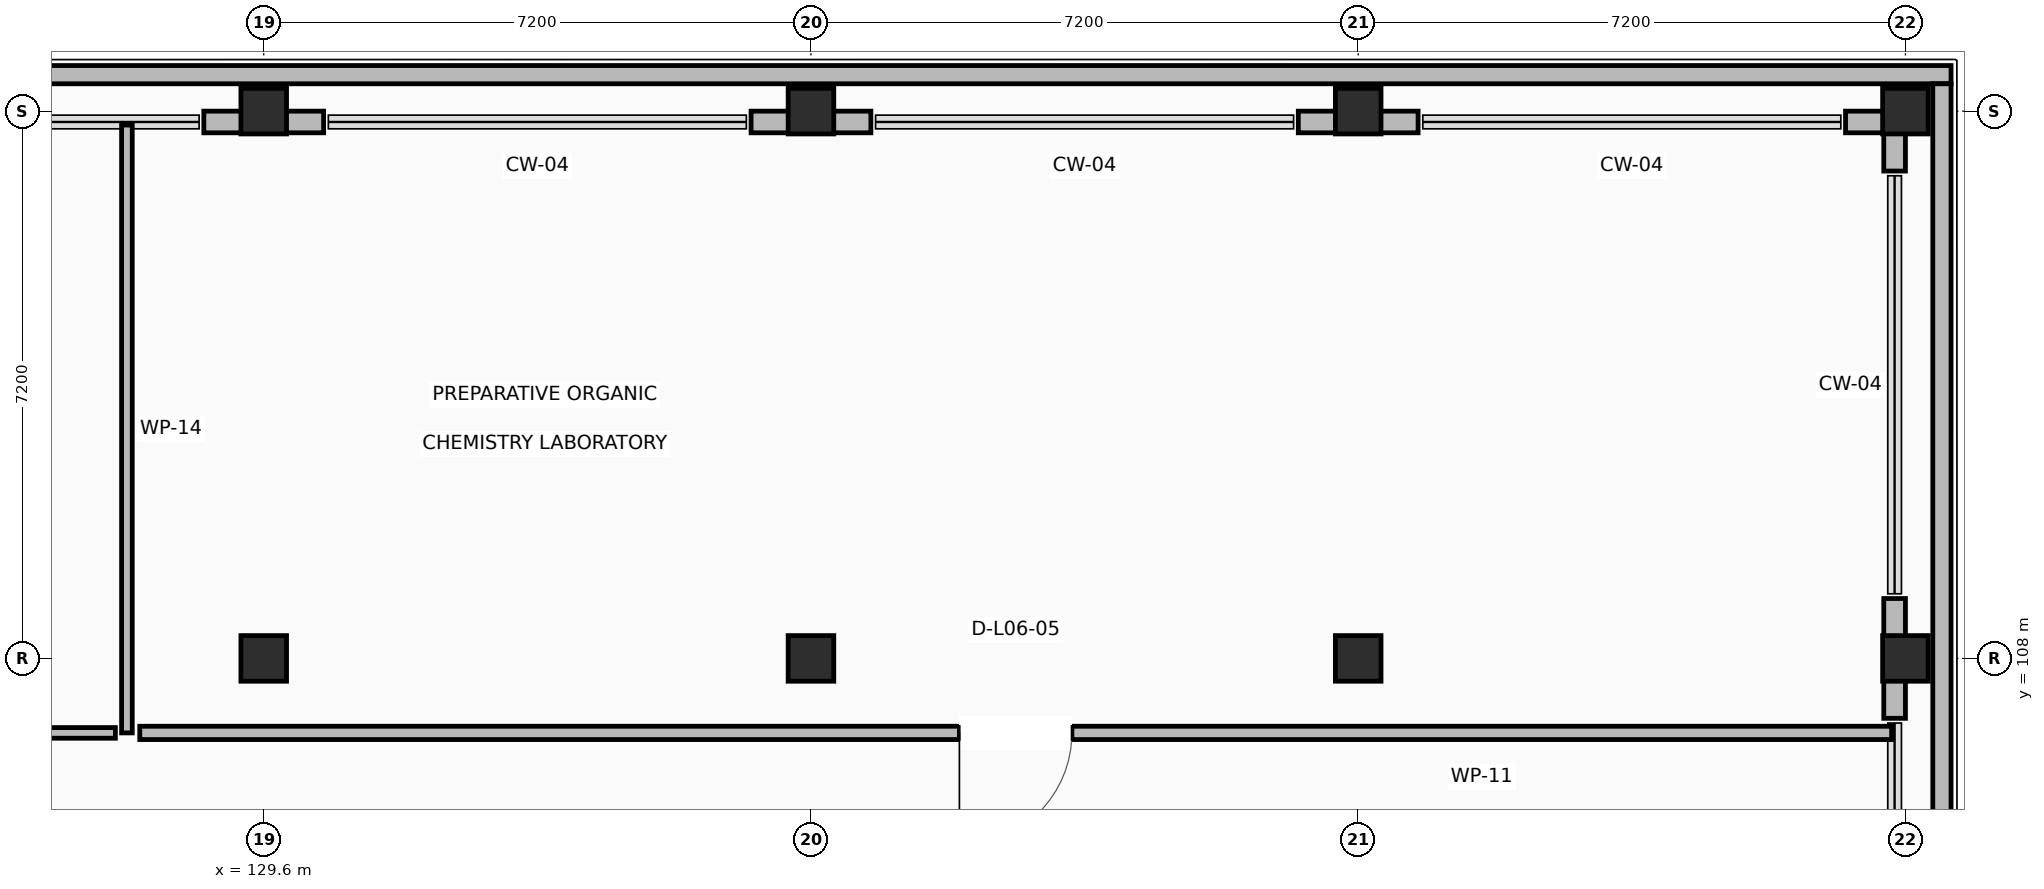
"""IFC4 building model, lengths in metres.
Left out: names, types, materials, properties, quantities, classifications, styles, units other than length and angle.
Written with IfcOpenShell. Run it as: python <this file> out.ifc"""

import sys

from ifc_helpers import new_model, si_unit, direction, frame, frame_2d, origin, origin_2d, place, context, subcontext, project, spatial, rectangle, extrude, element, fill, save


model = new_model("IFC4")
c1 = context("Model", 3, precision=1e-05, world=origin(), true_north=direction((0.0, 1.0)))
c2 = subcontext(c1, "Body", "Model", "MODEL_VIEW")
j1 = project(units=[si_unit("LENGTHUNIT", "METRE"), si_unit("PLANEANGLEUNIT", "RADIAN")], contexts=[c1])
p1 = place(None, origin())
s1 = spatial("IfcSite", under=j1, at=p1, CompositionType="ELEMENT")
p2 = place(p1, origin())
s2 = spatial("IfcBuilding", under=s1, at=p2, CompositionType="ELEMENT")
p3 = place(p2, frame((0.0, 0.0, 27.0)))
s3 = spatial("IfcBuildingStorey", under=s2, at=p3, CompositionType="ELEMENT", Elevation=27.0)
for number, where, z_axis, x_axis in (
    (1, (129.6, 108.0, 0.0), (0.0, 0.0, 1.0), (1.0, 0.0, 0.0)),
    (2, (129.6, 115.2, 0.0), (0.0, 0.0, 1.0), (1.0, 0.0, 0.0)),
    (3, (136.8, 108.0, 0.0), (0.0, 0.0, 1.0), (1.0, 0.0, 0.0)),
    (4, (136.8, 115.2, 0.0), (0.0, 0.0, 1.0), (1.0, 0.0, 0.0)),
    (5, (144.0, 108.0, 0.0), (0.0, 0.0, 1.0), (1.0, 0.0, 0.0)),
    (6, (144.0, 115.2, 0.0), (0.0, 0.0, 1.0), (1.0, 0.0, 0.0)),
    (7, (151.2, 108.0, 0.0), (0.0, 0.0, 1.0), (1.0, 0.0, 0.0)),
    (8, (151.2, 115.2, 0.0), (0.0, 0.0, 1.0), (1.0, 0.0, 0.0)),
):
    element("IfcColumn", number, at=place(p3, frame(where, z_axis=z_axis, x_axis=x_axis)), inside=s3, PredefinedType="COLUMN", context=c2, shape_type="SweptSolid", body=[
        extrude(rectangle(XDim=0.6, YDim=0.6, at=origin_2d()), origin(), (0.0, 0.0, 1.0), 3.92),
    ])
p4 = place(p3, frame((151.058, 107.212, 0.0), z_axis=(0.0, 0.0, 1.0), x_axis=(0.0, 1.0, 0.0)))
e9 = element("IfcWall", 9, at=p4, inside=s3, PredefinedType="STANDARD", context=c2, shape_type="SweptSolid", body=[
    extrude(rectangle(XDim=1.576, YDim=0.285, at=frame_2d((0.788, 0.0))), origin(), (0.0, 0.0, 1.0), 2.96),
])
p5 = place(p3, frame((151.058, 114.412, 0.0), z_axis=(0.0, 0.0, 1.0), x_axis=(0.0, 1.0, 0.0)))
e10 = element("IfcWall", 10, at=p5, inside=s3, PredefinedType="STANDARD", context=c2, shape_type="SweptSolid", body=[
    extrude(rectangle(XDim=0.503, YDim=0.285, at=frame_2d((0.251, 0.0))), origin(), (0.0, 0.0, 1.0), 2.96),
])
p6 = place(p3, frame((151.2, 115.058, 0.0), z_axis=(0.0, 0.0, 1.0), x_axis=(-1.0, 0.0, 0.0)))
e11 = element("IfcWall", 11, at=p6, inside=s3, PredefinedType="STANDARD", context=c2, shape_type="SweptSolid", body=[
    extrude(rectangle(XDim=0.788, YDim=0.285, at=frame_2d((0.394, 0.0))), origin(), (0.0, 0.0, 1.0), 2.96),
])
p7 = place(p3, frame((144.788, 115.058, 0.0), z_axis=(0.0, 0.0, 1.0), x_axis=(-1.0, 0.0, 0.0)))
e12 = element("IfcWall", 12, at=p7, inside=s3, PredefinedType="STANDARD", context=c2, shape_type="SweptSolid", body=[
    extrude(rectangle(XDim=1.576, YDim=0.285, at=frame_2d((0.788, 0.0))), origin(), (0.0, 0.0, 1.0), 2.96),
])
for number, where, z_axis, x_axis in (
    (13, (137.588, 115.058, 0.0), (0.0, 0.0, 1.0), (-1.0, 0.0, 0.0)),
    (14, (130.388, 115.058, 0.0), (0.0, 0.0, 1.0), (-1.0, 0.0, 0.0)),
):
    element("IfcWall", number, at=place(p3, frame(where, z_axis=z_axis, x_axis=x_axis)), inside=s3, PredefinedType="STANDARD", context=c2, shape_type="SweptSolid", body=[
        extrude(rectangle(XDim=1.576, YDim=0.285, at=frame_2d((0.788, 0.0))), origin(), (0.0, 0.0, 1.0), 2.96),
    ])
p8 = place(p3, frame((78.6, 115.68, 0.0), z_axis=(0.0, 0.0, 1.0), x_axis=(1.0, 0.0, 0.0)))
e15 = element("IfcWall", 15, at=p8, inside=s3, PredefinedType="PARAPET", context=c2, shape_type="SweptSolid", body=[
    extrude(rectangle(XDim=73.2, YDim=0.24, at=frame_2d((36.6, 0.0))), origin(), (0.0, 0.0, 1.0), 1.12),
])
p9 = place(p3, frame((151.68, 115.56, 0.0), z_axis=(0.0, 0.0, 1.0), x_axis=(0.0, -1.0, 0.0)))
e16 = element("IfcWall", 16, at=p9, inside=s3, PredefinedType="PARAPET", context=c2, shape_type="SweptSolid", body=[
    extrude(rectangle(XDim=21.36, YDim=0.24, at=frame_2d((10.68, 0.0))), origin(), (0.0, 0.0, 1.0), 1.12),
])
p10 = place(p3, frame((127.8, 115.017, 0.0), z_axis=(0.0, 0.0, 1.0), x_axis=(0.0, -1.0, 0.0)))
e17 = element("IfcWall", 17, at=p10, inside=s3, PredefinedType="PARTITIONING", context=c2, shape_type="SweptSolid", body=[
    extrude(rectangle(XDim=7.997, YDim=0.14, at=frame_2d((3.999, 0.0))), origin(), (0.0, 0.0, 1.0), 2.96),
])
p11 = place(p3, frame((127.648, 107.02, 0.0), z_axis=(0.0, 0.0, 1.0), x_axis=(-1.0, 0.0, 0.0)))
e18 = element("IfcWall", 18, at=p11, inside=s3, PredefinedType="PARTITIONING", context=c2, shape_type="SweptSolid", body=[
    extrude(rectangle(XDim=28.652, YDim=0.14, at=frame_2d((14.326, 0.0))), origin(), (0.0, 0.0, 1.0), 2.96),
])
p12 = place(p11, frame((13.851, 0.0, 0.0)))
e19 = element("IfcOpeningElement", 19, at=p12, cuts=e18, PredefinedType="OPENING", context=c2, shape_type="SweptSolid", body=[
    extrude(rectangle(XDim=0.95, YDim=2.1, at=frame_2d((0.475, 1.05))), frame((0.0, 0.08, 0.0), z_axis=(0.0, -1.0, 0.0), x_axis=(1.0, 0.0, 0.0)), (0.0, 0.0, 1.0), 0.16),
])
p13 = place(p3, frame((151.018, 107.02, 0.0), z_axis=(0.0, 0.0, 1.0), x_axis=(-1.0, 0.0, 0.0)))
e20 = element("IfcWall", 20, at=p13, inside=s3, PredefinedType="PARTITIONING", context=c2, shape_type="SweptSolid", body=[
    extrude(rectangle(XDim=23.049, YDim=0.175, at=frame_2d((11.524, 0.0))), origin(), (0.0, 0.0, 1.0), 2.96),
])
p14 = place(p13, frame((10.785, 0.0, 0.0)))
e21 = element("IfcOpeningElement", 21, at=p14, cuts=e20, PredefinedType="OPENING", context=c2, shape_type="SweptSolid", body=[
    extrude(rectangle(XDim=1.48, YDim=2.2, at=frame_2d((0.74, 1.1))), frame((0.0, 0.097, 0.0), z_axis=(0.0, -1.0, 0.0), x_axis=(1.0, 0.0, 0.0)), (0.0, 0.0, 1.0), 0.195),
])
p15 = place(p14, origin())
e22 = element("IfcDoor", 22, at=p15, inside=s3, OperationType="SINGLE_SWING_RIGHT", PredefinedType="DOOR", context=c2, shape_type="SweptSolid", body=[
    extrude(rectangle(XDim=1.48, YDim=2.2, at=frame_2d((0.74, 1.1))), frame((0.0, 0.025, 0.0), z_axis=(0.0, -1.0, 0.0), x_axis=(1.0, 0.0, 0.0)), (0.0, 0.0, 1.0), 0.05),
])
fill(e21, e22)
save(model, sys.argv[1])
